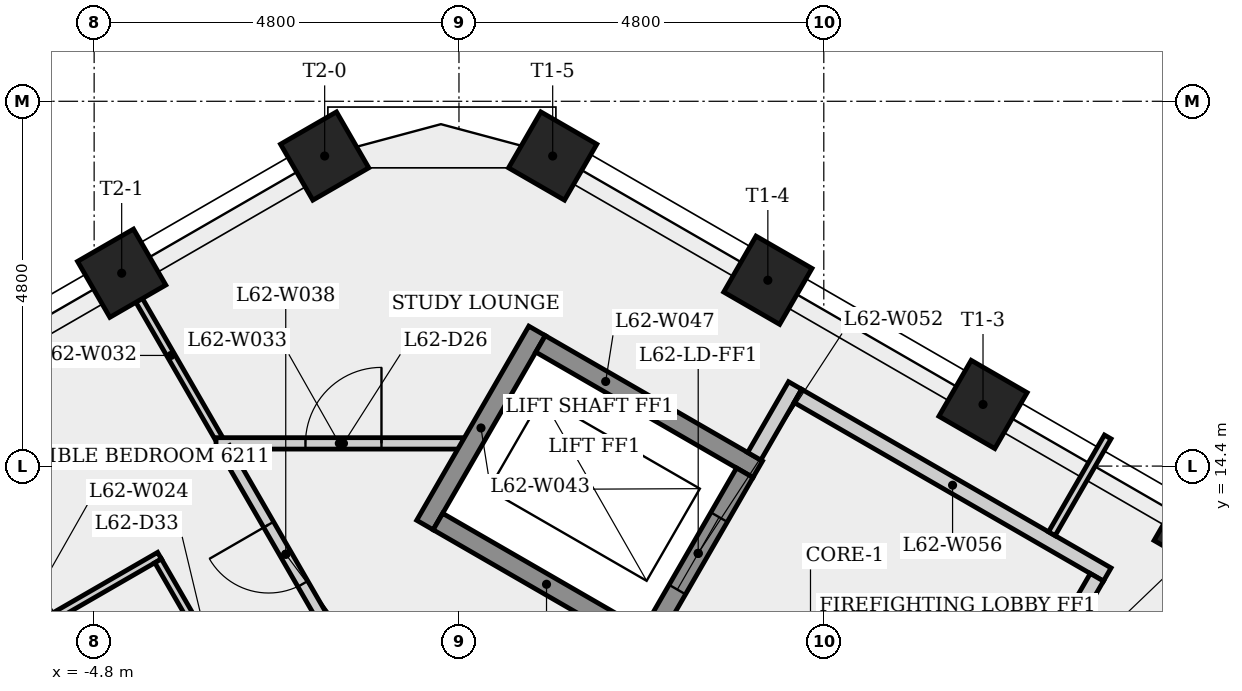
"""IFC4 building model, lengths in metres.
Left out: names, types, materials, properties, quantities, classifications, styles, units other than length and angle.
Written with IfcOpenShell. Run it as: python <this file> out.ifc"""

import sys

from ifc_helpers import new_model, si_unit, direction, frame, frame_2d, origin, origin_2d, place, context, subcontext, project, spatial, rectangle, extrude, element, fill, save


model = new_model("IFC4")
c1 = context("Model", 3, precision=1e-05, world=origin(), true_north=direction((0.0, 1.0)))
c2 = subcontext(c1, "Body", "Model", "MODEL_VIEW")
j1 = project(units=[si_unit("LENGTHUNIT", "METRE"), si_unit("PLANEANGLEUNIT", "RADIAN")], contexts=[c1])
p1 = place(None, origin())
s1 = spatial("IfcSite", under=j1, at=p1, CompositionType="ELEMENT")
p2 = place(p1, origin())
s2 = spatial("IfcBuilding", under=s1, at=p2, CompositionType="ELEMENT")
p3 = place(p2, frame((0.0, 0.0, 232.5)))
s3 = spatial("IfcBuildingStorey", under=s2, at=p3, CompositionType="ELEMENT", Elevation=232.5)
for number, where, z_axis, x_axis in (
    (1, (9.726, 13.576, 0.0), (0.0, 0.0, 1.0), (0.5, 0.866, 0.0)),
    (2, (6.895, 15.211, 0.0), (0.0, 0.0, 1.0), (0.5, 0.866, 0.0)),
    (3, (4.064, 16.845, 0.0), (0.0, 0.0, 1.0), (0.5, 0.866, 0.0)),
    (4, (1.233, 18.48, 0.0), (0.0, 0.0, 1.0), (0.5, 0.866, 0.0)),
    (5, (-1.767, 18.48, 0.0), (0.0, 0.0, 1.0), (-0.5, 0.866, 0.0)),
    (6, (-4.438, 16.938, 0.0), (0.0, 0.0, 1.0), (-0.5, 0.866, 0.0)),
):
    element("IfcColumn", number, at=place(p3, frame(where, z_axis=z_axis, x_axis=x_axis)), inside=s3, PredefinedType="COLUMN", context=c2, shape_type="SweptSolid", body=[
        extrude(rectangle(XDim=0.85, YDim=0.85, at=origin_2d()), origin(), (0.0, 0.0, 1.0), 3.4),
    ])
p4 = place(p3, frame((-7.103, 15.399, 0.0), z_axis=(0.0, 0.0, 1.0), x_axis=(0.500027320894, -0.866009629484, 0.0)))
e7 = element("IfcWall", 7, at=p4, inside=s3, PredefinedType="PARTITIONING", context=c2, shape_type="SweptSolid", body=[
    extrude(rectangle(XDim=6.193, YDim=0.1, at=frame_2d((3.096, 0.0))), origin(), (0.0, 0.0, 1.0), 3.05),
])
p5 = place(p3, frame((-3.94, 13.221, 0.0), z_axis=(0.0, 0.0, 1.0), x_axis=(-0.866028054938, -0.499995408039, 0.0)))
e8 = element("IfcWall", 8, at=p5, inside=s3, PredefinedType="PARTITIONING", context=c2, shape_type="SweptSolid", body=[
    extrude(rectangle(XDim=1.6, YDim=0.1, at=frame_2d((0.8, 0.0))), origin(), (0.0, 0.0, 1.0), 3.05),
])
p6 = place(p3, frame((-3.159, 14.764, 0.0), z_axis=(0.0, 0.0, 1.0), x_axis=(-0.500032459767, 0.866006662318, 0.0)))
e9 = element("IfcWall", 9, at=p6, inside=s3, PredefinedType="PARTITIONING", context=c2, shape_type="SweptSolid", body=[
    extrude(rectangle(XDim=2.522, YDim=0.1, at=frame_2d((1.261, 0.0))), origin(), (0.0, 0.0, 1.0), 3.05),
])
p7 = place(p3, frame((-3.196, 14.699, 0.0), z_axis=(0.0, 0.0, 1.0), x_axis=(1.0, 0.0, 0.0)))
e10 = element("IfcWall", 10, at=p7, inside=s3, PredefinedType="PARTITIONING", context=c2, shape_type="SweptSolid", body=[
    extrude(rectangle(XDim=3.244, YDim=0.15, at=frame_2d((1.622, 0.0))), origin(), (0.0, 0.0, 1.0), 3.05),
])
p8 = place(p7, frame((1.177, 0.0, 0.0)))
e11 = element("IfcOpeningElement", 11, at=p8, cuts=e10, PredefinedType="OPENING", context=c2, shape_type="SweptSolid", body=[
    extrude(rectangle(XDim=1.0, YDim=2.1, at=frame_2d((0.5, 1.05))), frame((0.0, 0.085, 0.0), z_axis=(0.0, -1.0, 0.0), x_axis=(1.0, 0.0, 0.0)), (0.0, 0.0, 1.0), 0.17),
])
p9 = place(p3, frame((-2.621, 10.836, 0.0), z_axis=(0.0, 0.0, 1.0), x_axis=(-0.499967368674, 0.86604424267, 0.0)))
e12 = element("IfcWall", 12, at=p9, inside=s3, PredefinedType="PARTITIONING", context=c2, shape_type="SweptSolid", body=[
    extrude(rectangle(XDim=2.675, YDim=0.1, at=frame_2d((1.337, 0.0))), origin(), (0.0, 0.0, 1.0), 3.05),
])
p10 = place(p9, frame((0.938, 0.0, 0.0)))
e13 = element("IfcOpeningElement", 13, at=p10, cuts=e12, PredefinedType="OPENING", context=c2, shape_type="SweptSolid", body=[
    extrude(rectangle(XDim=0.8, YDim=2.1, at=frame_2d((0.4, 1.05))), frame((0.0, 0.06, 0.0), z_axis=(0.0, -1.0, 0.0), x_axis=(1.0, 0.0, 0.0)), (0.0, 0.0, 1.0), 0.12),
])
p11 = place(p3, frame((-1.474, 11.846, 0.0), z_axis=(0.0, 0.0, 1.0), x_axis=(-0.499989454812, 0.866031491966, 0.0)))
e14 = element("IfcWall", 14, at=p11, inside=s3, PredefinedType="PARTITIONING", context=c2, shape_type="SweptSolid", body=[
    extrude(rectangle(XDim=3.219, YDim=0.15, at=frame_2d((1.609, 0.0))), origin(), (0.0, 0.0, 1.0), 3.05),
])
p12 = place(p11, frame((1.159, 0.0, 0.0)))
e15 = element("IfcOpeningElement", 15, at=p12, cuts=e14, PredefinedType="OPENING", context=c2, shape_type="SweptSolid", body=[
    extrude(rectangle(XDim=0.9, YDim=2.1, at=frame_2d((0.45, 1.05))), frame((0.0, 0.085, 0.0), z_axis=(0.0, -1.0, 0.0), x_axis=(1.0, 0.0, 0.0)), (0.0, 0.0, 1.0), 0.17),
])
p13 = place(p3, frame((-0.448, 13.624, 0.0), z_axis=(0.0, 0.0, 1.0), x_axis=(0.500037662692, 0.866003658127, 0.0)))
e16 = element("IfcWall", 16, at=p13, inside=s3, PredefinedType="SHEAR", context=c2, shape_type="SweptSolid", body=[
    extrude(rectangle(XDim=2.95, YDim=0.25, at=frame_2d((1.475, 0.0))), origin(), (0.0, 0.0, 1.0), 3.05),
])
for number, where, z_axis, x_axis in (
    (17, (1.073, 16.008, 0.0), (0.0, 0.0, 1.0), (0.866, -0.5, 0.0)),
    (18, (2.581, 12.02, 0.0), (0.0, 0.0, 1.0), (-0.866, 0.5, 0.0)),
):
    element("IfcWall", number, at=place(p3, frame(where, z_axis=z_axis, x_axis=x_axis)), inside=s3, PredefinedType="SHEAR", context=c2, shape_type="SweptSolid", body=[
        extrude(rectangle(XDim=3.3, YDim=0.25, at=frame_2d((1.65, 0.0))), origin(), (0.0, 0.0, 1.0), 3.05),
    ])
p14 = place(p3, frame((2.535, 12.191, 0.0), z_axis=(0.0, 0.0, 1.0), x_axis=(0.500061746146, 0.865989751695, 0.0)))
e19 = element("IfcWall", 19, at=p14, inside=s3, PredefinedType="SHEAR", context=c2, shape_type="SweptSolid", body=[
    extrude(rectangle(XDim=2.45, YDim=0.25, at=frame_2d((1.225, 0.0))), origin(), (0.0, 0.0, 1.0), 3.4),
])
p15 = place(p14, frame((0.675, 0.0, 0.0)))
e20 = element("IfcOpeningElement", 20, at=p15, cuts=e19, PredefinedType="OPENING", context=c2, shape_type="SweptSolid", body=[
    extrude(rectangle(XDim=1.1, YDim=2.1, at=frame_2d((0.55, 1.05))), frame((0.0, 0.135, 0.0), z_axis=(0.0, -1.0, 0.0), x_axis=(1.0, 0.0, 0.0)), (0.0, 0.0, 1.0), 0.27),
])
p16 = place(p3, frame((3.885, 14.529, 0.0), z_axis=(0.0, 0.0, 1.0), x_axis=(0.499997628298, 0.866026773083, 0.0)))
e21 = element("IfcWall", 21, at=p16, inside=s3, PredefinedType="PARTITIONING", context=c2, shape_type="SweptSolid", body=[
    extrude(rectangle(XDim=1.075, YDim=0.2, at=frame_2d((0.538, 0.0))), origin(), (0.0, 0.0, 1.0), 3.05),
])
p17 = place(p3, frame((4.459, 15.323, 0.0), z_axis=(0.0, 0.0, 1.0), x_axis=(0.866016039709, -0.500016218704, 0.0)))
e22 = element("IfcWall", 22, at=p17, inside=s3, PredefinedType="PARTITIONING", context=c2, shape_type="SweptSolid", body=[
    extrude(rectangle(XDim=4.7, YDim=0.2, at=frame_2d((2.35, 0.0))), origin(), (0.0, 0.0, 1.0), 3.05),
])
p18 = place(p3, frame((6.48, 9.624, 0.0), z_axis=(0.0, 0.0, 1.0), x_axis=(0.500017246033, 0.866015446554, 0.0)))
e23 = element("IfcWall", 23, at=p18, inside=s3, PredefinedType="SHEAR", context=c2, shape_type="SweptSolid", body=[
    extrude(rectangle(XDim=3.25, YDim=0.25, at=frame_2d((1.625, 0.0))), origin(), (0.0, 0.0, 1.0), 3.05),
])
p19 = place(p18, frame((1.125, 0.0, 0.0)))
e24 = element("IfcOpeningElement", 24, at=p19, cuts=e23, PredefinedType="OPENING", context=c2, shape_type="SweptSolid", body=[
    extrude(rectangle(XDim=1.0, YDim=2.1, at=frame_2d((0.5, 1.05))), frame((0.0, 0.135, 0.0), z_axis=(0.0, -1.0, 0.0), x_axis=(1.0, 0.0, 0.0)), (0.0, 0.0, 1.0), 0.27),
])
p20 = place(p3, frame((7.8, 13.51, 0.0), z_axis=(0.0, 0.0, 1.0), x_axis=(0.500048082433, 0.865997641599, 0.0)))
e25 = element("IfcWall", 25, at=p20, inside=s3, PredefinedType="PARTITIONING", context=c2, shape_type="SweptSolid", body=[
    extrude(rectangle(XDim=1.471, YDim=0.1, at=frame_2d((0.735, 0.0))), origin(), (0.0, 0.0, 1.0), 3.05),
])
p21 = place(p3, frame((8.393, 12.937, 0.0), z_axis=(0.0, 0.0, 1.0), x_axis=(-0.500065409566, -0.86598763626, 0.0)))
e26 = element("IfcWall", 26, at=p21, inside=s3, PredefinedType="PARTITIONING", context=c2, shape_type="SweptSolid", body=[
    extrude(rectangle(XDim=0.575, YDim=0.2, at=frame_2d((0.288, 0.0))), origin(), (0.0, 0.0, 1.0), 3.05),
])
p22 = place(p15, origin())
e27 = element("IfcDoor", 27, at=p22, inside=s3, OperationType="SLIDING_TO_LEFT", PredefinedType="DOOR", context=c2, shape_type="SweptSolid", body=[
    extrude(rectangle(XDim=1.1, YDim=2.1, at=frame_2d((0.55, 1.05))), frame((0.0, 0.025, 0.0), z_axis=(0.0, -1.0, 0.0), x_axis=(1.0, 0.0, 0.0)), (0.0, 0.0, 1.0), 0.05),
])
fill(e20, e27)
p23 = place(p8, origin())
e28 = element("IfcDoor", 28, at=p23, inside=s3, OperationType="SINGLE_SWING_RIGHT", PredefinedType="DOOR", context=c2, shape_type="SweptSolid", body=[
    extrude(rectangle(XDim=1.0, YDim=2.1, at=frame_2d((0.5, 1.05))), frame((0.0, 0.025, 0.0), z_axis=(0.0, -1.0, 0.0), x_axis=(1.0, 0.0, 0.0)), (0.0, 0.0, 1.0), 0.05),
])
fill(e11, e28)
p24 = place(p12, origin())
e29 = element("IfcDoor", 29, at=p24, inside=s3, OperationType="SINGLE_SWING_RIGHT", PredefinedType="DOOR", context=c2, shape_type="SweptSolid", body=[
    extrude(rectangle(XDim=0.9, YDim=2.1, at=frame_2d((0.45, 1.05))), frame((0.0, 0.025, 0.0), z_axis=(0.0, -1.0, 0.0), x_axis=(1.0, 0.0, 0.0)), (0.0, 0.0, 1.0), 0.05),
])
fill(e15, e29)
save(model, sys.argv[1])
